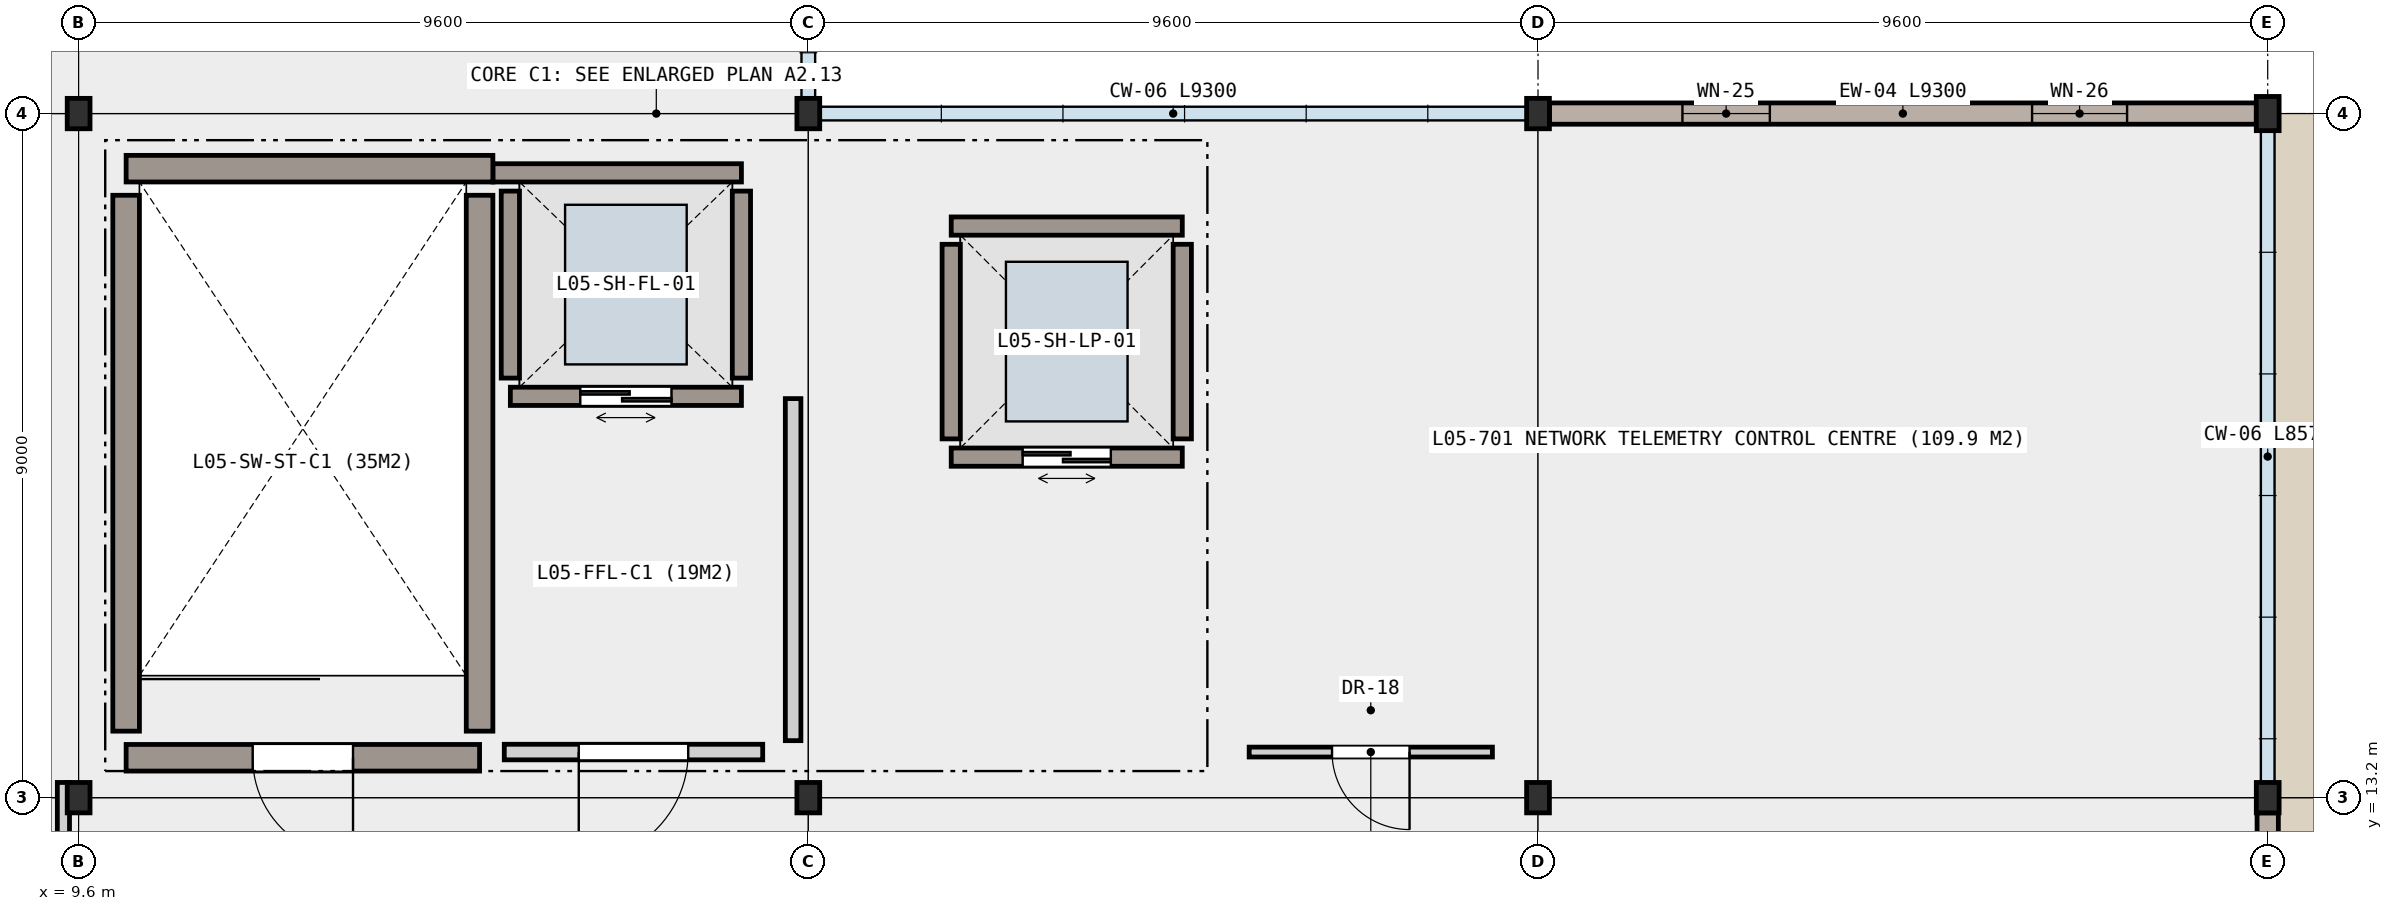
"""IFC4 building model, lengths in metres.
Left out: names, types, materials, properties, quantities, classifications, styles, units other than length and angle.
Written with IfcOpenShell. Run it as: python <this file> out.ifc"""

import sys

from ifc_helpers import new_model, si_unit, direction, frame, frame_2d, origin, origin_2d, place, context, subcontext, project, spatial, rectangle, i_section, extrude, element, fill, save


model = new_model("IFC4")
c1 = context("Model", 3, precision=1e-05, world=origin(), true_north=direction((0.0, 1.0)))
c2 = subcontext(c1, "Body", "Model", "MODEL_VIEW")
j1 = project(units=[si_unit("LENGTHUNIT", "METRE"), si_unit("PLANEANGLEUNIT", "RADIAN")], contexts=[c1])
p1 = place(None, origin())
s1 = spatial("IfcSite", under=j1, at=p1, CompositionType="ELEMENT")
p2 = place(p1, origin())
s2 = spatial("IfcBuilding", under=s1, at=p2, CompositionType="ELEMENT")
p3 = place(p2, frame((0.0, 0.0, 22.8)))
s3 = spatial("IfcBuildingStorey", under=s2, at=p3, CompositionType="ELEMENT", Elevation=22.8)
for number, where, z_axis, x_axis in (
    (1, (9.6, 13.2, 0.0), (0.0, 0.0, 1.0), (1.0, 0.0, 0.0)),
    (2, (9.6, 22.2, 0.0), (0.0, 0.0, 1.0), (1.0, 0.0, 0.0)),
    (3, (19.2, 13.2, 0.0), (0.0, 0.0, 1.0), (1.0, 0.0, 0.0)),
    (4, (19.2, 22.2, 0.0), (0.0, 0.0, 1.0), (1.0, 0.0, 0.0)),
    (5, (28.8, 13.2, 0.0), (0.0, 0.0, 1.0), (1.0, 0.0, 0.0)),
    (6, (28.8, 22.2, 0.0), (0.0, 0.0, 1.0), (1.0, 0.0, 0.0)),
    (7, (38.4, 13.2, 0.0), (0.0, 0.0, 1.0), (1.0, 0.0, 0.0)),
):
    element("IfcColumn", number, at=place(p3, frame(where, z_axis=z_axis, x_axis=x_axis)), inside=s3, PredefinedType="COLUMN", context=c2, shape_type="SweptSolid", body=[
        extrude(i_section(OverallWidth=0.3, OverallDepth=0.4, WebThickness=0.013, FlangeThickness=0.024, FilletRadius=0.027, at=origin_2d()), origin(), (0.0, 0.0, 1.0), 4.2),
    ])
p4 = place(p3, frame((38.4, 22.2, 0.0), z_axis=(0.0, 0.0, 1.0), x_axis=(1.0, 0.0, 0.0)))
e8 = element("IfcColumn", 8, at=p4, inside=s3, PredefinedType="COLUMN", context=c2, shape_type="SweptSolid", body=[
    extrude(i_section(OverallWidth=0.3, OverallDepth=0.45, WebThickness=0.014, FlangeThickness=0.026, FilletRadius=0.027, at=origin_2d()), origin(), (0.0, 0.0, 1.0), 4.2),
])
p5 = place(p3, frame((28.95, 22.2, 0.0), z_axis=(0.0, 0.0, 1.0), x_axis=(1.0, 0.0, 0.0)))
e9 = element("IfcWall", 9, at=p5, inside=s3, PredefinedType="SOLIDWALL", context=c2, shape_type="SweptSolid", body=[
    extrude(rectangle(XDim=9.3, YDim=0.28, at=frame_2d((4.65, 0.0))), origin(), (0.0, 0.0, 1.0), 3.57),
])
p6 = place(p5, frame((1.75, 0.0, 0.85)))
e10 = element("IfcOpeningElement", 10, at=p6, cuts=e9, PredefinedType="OPENING", context=c2, shape_type="SweptSolid", body=[
    extrude(rectangle(XDim=1.15, YDim=2.15, at=frame_2d((0.575, 1.075))), frame((0.0, 0.15, 0.0), z_axis=(0.0, -1.0, 0.0), x_axis=(1.0, 0.0, 0.0)), (0.0, 0.0, 1.0), 0.3),
])
p7 = place(p5, frame((6.35, 0.0, 0.85)))
e11 = element("IfcOpeningElement", 11, at=p7, cuts=e9, PredefinedType="OPENING", context=c2, shape_type="SweptSolid", body=[
    extrude(rectangle(XDim=1.25, YDim=1.5, at=frame_2d((0.625, 0.75))), frame((0.0, 0.15, 0.0), z_axis=(0.0, -1.0, 0.0), x_axis=(1.0, 0.0, 0.0)), (0.0, 0.0, 1.0), 0.3),
])
p8 = place(p3, frame((38.4, 13.0, 0.0), z_axis=(0.0, 0.0, 1.0), x_axis=(0.0, -1.0, 0.0)))
e12 = element("IfcWall", 12, at=p8, inside=s3, PredefinedType="SOLIDWALL", context=c2, shape_type="SweptSolid", body=[
    extrude(rectangle(XDim=6.2, YDim=0.28, at=frame_2d((3.1, 0.0))), origin(), (0.0, 0.0, 1.0), 3.57),
])
p9 = place(p8, frame((2.475, 0.0, 0.85)))
e13 = element("IfcOpeningElement", 13, at=p9, cuts=e12, PredefinedType="OPENING", context=c2, shape_type="SweptSolid", body=[
    extrude(rectangle(XDim=1.25, YDim=1.85, at=frame_2d((0.625, 0.925))), frame((0.0, 0.15, 0.0), z_axis=(0.0, -1.0, 0.0), x_axis=(1.0, 0.0, 0.0)), (0.0, 0.0, 1.0), 0.3),
])
p10 = place(p3, frame((18.32, 18.48, 0.0), z_axis=(0.0, 0.0, 1.0), x_axis=(-1.0, 0.0, 0.0)))
e14 = element("IfcWall", 14, at=p10, inside=s3, PredefinedType="SHEAR", context=c2, shape_type="SweptSolid", body=[
    extrude(rectangle(XDim=3.04, YDim=0.24, at=frame_2d((1.52, 0.0))), origin(), (0.0, 0.0, 1.0), 3.99),
])
p11 = place(p10, frame((0.92, 0.0, 0.0)))
e15 = element("IfcOpeningElement", 15, at=p11, cuts=e14, PredefinedType="OPENING", context=c2, shape_type="SweptSolid", body=[
    extrude(rectangle(XDim=1.2, YDim=2.15, at=frame_2d((0.6, 1.075))), frame((0.0, 0.13, 0.0), z_axis=(0.0, -1.0, 0.0), x_axis=(1.0, 0.0, 0.0)), (0.0, 0.0, 1.0), 0.26),
])
p12 = place(p3, frame((15.05, 21.42, 0.0), z_axis=(0.0, 0.0, 1.0), x_axis=(1.0, 0.0, 0.0)))
e16 = element("IfcWall", 16, at=p12, inside=s3, PredefinedType="SHEAR", context=c2, shape_type="SweptSolid", body=[
    extrude(rectangle(XDim=3.27, YDim=0.24, at=frame_2d((1.635, 0.0))), origin(), (0.0, 0.0, 1.0), 3.99),
])
for number, where, z_axis, x_axis in (
    (17, (15.28, 18.72, 0.0), (0.0, 0.0, 1.0), (0.0, 1.0, 0.0)),
    (18, (18.32, 21.18, 0.0), (0.0, 0.0, 1.0), (0.0, -1.0, 0.0)),
):
    element("IfcWall", number, at=place(p3, frame(where, z_axis=z_axis, x_axis=x_axis)), inside=s3, PredefinedType="SHEAR", context=c2, shape_type="SweptSolid", body=[
        extrude(rectangle(XDim=2.46, YDim=0.24, at=frame_2d((1.23, 0.0))), origin(), (0.0, 0.0, 1.0), 3.99),
    ])
p13 = place(p3, frame((24.12, 17.68, 0.0), z_axis=(0.0, 0.0, 1.0), x_axis=(-1.0, 0.0, 0.0)))
e19 = element("IfcWall", 19, at=p13, inside=s3, PredefinedType="SHEAR", context=c2, shape_type="SweptSolid", body=[
    extrude(rectangle(XDim=3.04, YDim=0.24, at=frame_2d((1.52, 0.0))), origin(), (0.0, 0.0, 1.0), 3.99),
])
p14 = place(p13, frame((0.94, 0.0, 0.0)))
e20 = element("IfcOpeningElement", 20, at=p14, cuts=e19, PredefinedType="OPENING", context=c2, shape_type="SweptSolid", body=[
    extrude(rectangle(XDim=1.16, YDim=2.15, at=frame_2d((0.58, 1.075))), frame((0.0, 0.13, 0.0), z_axis=(0.0, -1.0, 0.0), x_axis=(1.0, 0.0, 0.0)), (0.0, 0.0, 1.0), 0.26),
])
p15 = place(p3, frame((21.08, 20.72, 0.0), z_axis=(0.0, 0.0, 1.0), x_axis=(1.0, 0.0, 0.0)))
e21 = element("IfcWall", 21, at=p15, inside=s3, PredefinedType="SHEAR", context=c2, shape_type="SweptSolid", body=[
    extrude(rectangle(XDim=3.04, YDim=0.24, at=frame_2d((1.52, 0.0))), origin(), (0.0, 0.0, 1.0), 3.99),
])
for number, where, z_axis, x_axis in (
    (22, (21.08, 17.92, 0.0), (0.0, 0.0, 1.0), (0.0, 1.0, 0.0)),
    (23, (24.12, 20.48, 0.0), (0.0, 0.0, 1.0), (0.0, -1.0, 0.0)),
):
    element("IfcWall", number, at=place(p3, frame(where, z_axis=z_axis, x_axis=x_axis)), inside=s3, PredefinedType="SHEAR", context=c2, shape_type="SweptSolid", body=[
        extrude(rectangle(XDim=2.56, YDim=0.24, at=frame_2d((1.28, 0.0))), origin(), (0.0, 0.0, 1.0), 3.99),
    ])
p16 = place(p3, frame((14.875, 13.725, 0.0), z_axis=(0.0, 0.0, 1.0), x_axis=(-1.0, 0.0, 0.0)))
e24 = element("IfcWall", 24, at=p16, inside=s3, PredefinedType="SHEAR", context=c2, shape_type="SweptSolid", body=[
    extrude(rectangle(XDim=4.65, YDim=0.35, at=frame_2d((2.325, 0.0))), origin(), (0.0, 0.0, 1.0), 3.99),
])
p17 = place(p16, frame((1.665, 0.0, 0.0)))
e25 = element("IfcOpeningElement", 25, at=p17, cuts=e24, PredefinedType="OPENING", context=c2, shape_type="SweptSolid", body=[
    extrude(rectangle(XDim=1.32, YDim=2.15, at=frame_2d((0.66, 1.075))), frame((0.0, 0.185, 0.0), z_axis=(0.0, -1.0, 0.0), x_axis=(1.0, 0.0, 0.0)), (0.0, 0.0, 1.0), 0.37),
])
p18 = place(p3, frame((10.225, 21.475, 0.0), z_axis=(0.0, 0.0, 1.0), x_axis=(1.0, 0.0, 0.0)))
e26 = element("IfcWall", 26, at=p18, inside=s3, PredefinedType="SHEAR", context=c2, shape_type="SweptSolid", body=[
    extrude(rectangle(XDim=4.825, YDim=0.35, at=frame_2d((2.413, 0.0))), origin(), (0.0, 0.0, 1.0), 3.99),
])
for number, where, z_axis, x_axis in (
    (27, (10.225, 14.075, 0.0), (0.0, 0.0, 1.0), (0.0, 1.0, 0.0)),
    (28, (14.875, 21.125, 0.0), (0.0, 0.0, 1.0), (0.0, -1.0, 0.0)),
):
    element("IfcWall", number, at=place(p3, frame(where, z_axis=z_axis, x_axis=x_axis)), inside=s3, PredefinedType="SHEAR", context=c2, shape_type="SweptSolid", body=[
        extrude(rectangle(XDim=7.05, YDim=0.35, at=frame_2d((3.525, 0.0))), origin(), (0.0, 0.0, 1.0), 3.99),
    ])
p19 = place(p3, frame((18.6, 13.8, 0.0), z_axis=(0.0, 0.0, 1.0), x_axis=(-1.0, 0.0, 0.0)))
e29 = element("IfcWall", 29, at=p19, inside=s3, PredefinedType="PARTITIONING", context=c2, shape_type="SweptSolid", body=[
    extrude(rectangle(XDim=3.4, YDim=0.205, at=frame_2d((1.7, 0.0))), origin(), (0.0, 0.0, 1.0), 3.99),
])
p20 = place(p19, frame((0.98, 0.0, 0.0)))
e30 = element("IfcOpeningElement", 30, at=p20, cuts=e29, PredefinedType="OPENING", context=c2, shape_type="SweptSolid", body=[
    extrude(rectangle(XDim=1.44, YDim=2.18, at=frame_2d((0.72, 1.09))), frame((0.0, 0.113, 0.0), z_axis=(0.0, -1.0, 0.0), x_axis=(1.0, 0.0, 0.0)), (0.0, 0.0, 1.0), 0.225),
])
p21 = place(p3, frame((19.0, 18.45, 0.0), z_axis=(0.0, 0.0, 1.0), x_axis=(0.0, -1.0, 0.0)))
e31 = element("IfcWall", 31, at=p21, inside=s3, PredefinedType="PARTITIONING", context=c2, shape_type="SweptSolid", body=[
    extrude(rectangle(XDim=4.5, YDim=0.205, at=frame_2d((2.25, 0.0))), origin(), (0.0, 0.0, 1.0), 3.57),
])
p22 = place(p3, frame((28.2, 13.8, 0.0), z_axis=(0.0, 0.0, 1.0), x_axis=(-1.0, 0.0, 0.0)))
e32 = element("IfcWall", 32, at=p22, inside=s3, PredefinedType="PARTITIONING", context=c2, shape_type="SweptSolid", body=[
    extrude(rectangle(XDim=3.2, YDim=0.13, at=frame_2d((1.6, 0.0))), origin(), (0.0, 0.0, 1.0), 3.99),
])
p23 = place(p22, frame((1.09, 0.0, 0.0)))
e33 = element("IfcOpeningElement", 33, at=p23, cuts=e32, PredefinedType="OPENING", context=c2, shape_type="SweptSolid", body=[
    extrude(rectangle(XDim=1.02, YDim=2.14, at=frame_2d((0.51, 1.07))), frame((0.0, 0.075, 0.0), z_axis=(0.0, -1.0, 0.0), x_axis=(1.0, 0.0, 0.0)), (0.0, 0.0, 1.0), 0.15),
])
p24 = place(p3, frame((9.4, 13.4, 0.0), z_axis=(0.0, 0.0, 1.0), x_axis=(0.0, -1.0, 0.0)))
e34 = element("IfcWall", 34, at=p24, inside=s3, PredefinedType="PARTITIONING", context=c2, shape_type="SweptSolid", body=[
    extrude(rectangle(XDim=3.4, YDim=0.16, at=frame_2d((1.7, 0.0))), origin(), (0.0, 0.0, 1.0), 3.57),
])
p25 = place(p24, frame((1.13, 0.0, 0.0)))
e35 = element("IfcOpeningElement", 35, at=p25, cuts=e34, PredefinedType="OPENING", context=c2, shape_type="SweptSolid", body=[
    extrude(rectangle(XDim=1.14, YDim=2.16, at=frame_2d((0.57, 1.08))), frame((0.0, 0.09, 0.0), z_axis=(0.0, -1.0, 0.0), x_axis=(1.0, 0.0, 0.0)), (0.0, 0.0, 1.0), 0.18),
])
p26 = place(p6, origin())
e36 = element("IfcWindow", 36, at=p26, inside=s3, PartitioningType="SINGLE_PANEL", PredefinedType="WINDOW", context=c2, shape_type="SweptSolid", body=[
    extrude(rectangle(XDim=1.15, YDim=2.15, at=frame_2d((0.575, 1.075))), frame((0.0, 0.03, 0.0), z_axis=(0.0, -1.0, 0.0), x_axis=(1.0, 0.0, 0.0)), (0.0, 0.0, 1.0), 0.06),
])
fill(e10, e36)
p27 = place(p7, origin())
e37 = element("IfcWindow", 37, at=p27, inside=s3, PartitioningType="SINGLE_PANEL", PredefinedType="WINDOW", context=c2, shape_type="SweptSolid", body=[
    extrude(rectangle(XDim=1.25, YDim=1.5, at=frame_2d((0.625, 0.75))), frame((0.0, 0.03, 0.0), z_axis=(0.0, -1.0, 0.0), x_axis=(1.0, 0.0, 0.0)), (0.0, 0.0, 1.0), 0.06),
])
fill(e11, e37)
p28 = place(p11, origin())
e38 = element("IfcDoor", 38, at=p28, inside=s3, OperationType="DOUBLE_DOOR_SLIDING", PredefinedType="DOOR", context=c2, shape_type="SweptSolid", body=[
    extrude(rectangle(XDim=1.2, YDim=2.15, at=frame_2d((0.6, 1.075))), frame((0.0, 0.025, 0.0), z_axis=(0.0, -1.0, 0.0), x_axis=(1.0, 0.0, 0.0)), (0.0, 0.0, 1.0), 0.05),
])
fill(e15, e38)
p29 = place(p14, origin())
e39 = element("IfcDoor", 39, at=p29, inside=s3, OperationType="DOUBLE_DOOR_SLIDING", PredefinedType="DOOR", context=c2, shape_type="SweptSolid", body=[
    extrude(rectangle(XDim=1.16, YDim=2.15, at=frame_2d((0.58, 1.075))), frame((0.0, 0.025, 0.0), z_axis=(0.0, -1.0, 0.0), x_axis=(1.0, 0.0, 0.0)), (0.0, 0.0, 1.0), 0.05),
])
fill(e20, e39)
p30 = place(p17, origin())
e40 = element("IfcDoor", 40, at=p30, inside=s3, OperationType="SINGLE_SWING_LEFT", PredefinedType="DOOR", context=c2, shape_type="SweptSolid", body=[
    extrude(rectangle(XDim=1.32, YDim=2.15, at=frame_2d((0.66, 1.075))), frame((0.0, 0.025, 0.0), z_axis=(0.0, -1.0, 0.0), x_axis=(1.0, 0.0, 0.0)), (0.0, 0.0, 1.0), 0.05),
])
fill(e25, e40)
p31 = place(p20, origin())
e41 = element("IfcDoor", 41, at=p31, inside=s3, OperationType="SINGLE_SWING_RIGHT", PredefinedType="DOOR", context=c2, shape_type="SweptSolid", body=[
    extrude(rectangle(XDim=1.44, YDim=2.18, at=frame_2d((0.72, 1.09))), frame((0.0, 0.025, 0.0), z_axis=(0.0, -1.0, 0.0), x_axis=(1.0, 0.0, 0.0)), (0.0, 0.0, 1.0), 0.05),
])
fill(e30, e41)
p32 = place(p23, origin())
e42 = element("IfcDoor", 42, at=p32, inside=s3, OperationType="SINGLE_SWING_LEFT", PredefinedType="DOOR", context=c2, shape_type="SweptSolid", body=[
    extrude(rectangle(XDim=1.02, YDim=2.14, at=frame_2d((0.51, 1.07))), frame((0.0, 0.025, 0.0), z_axis=(0.0, -1.0, 0.0), x_axis=(1.0, 0.0, 0.0)), (0.0, 0.0, 1.0), 0.05),
])
fill(e33, e42)
save(model, sys.argv[1])
